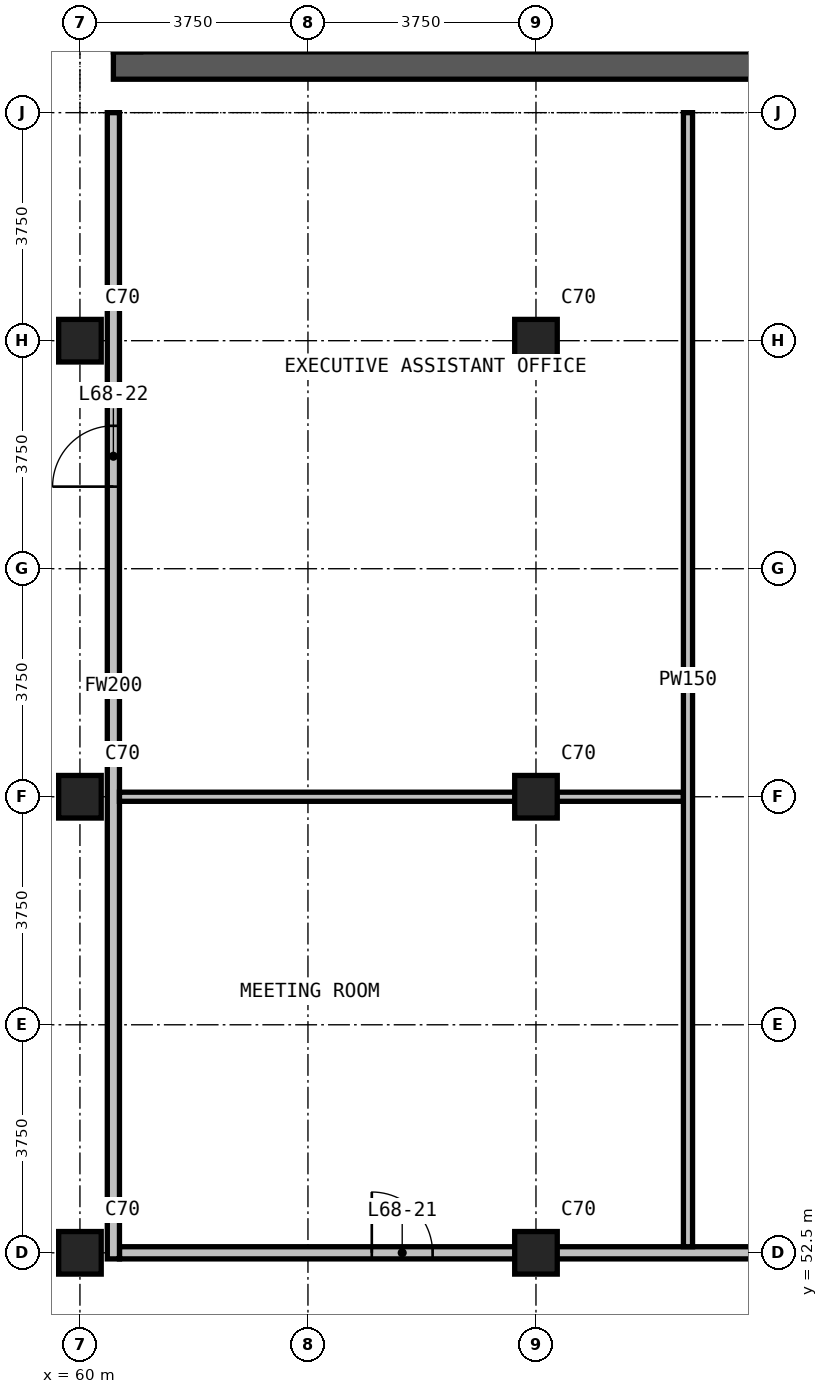
"""IFC4 building model, lengths in metres.
Left out: names, types, materials, properties, quantities, classifications, styles, units other than length and angle.
Written with IfcOpenShell. Run it as: python <this file> out.ifc"""

import sys

from ifc_helpers import new_model, si_unit, direction, frame, frame_2d, origin, origin_2d, place, context, subcontext, project, spatial, rectangle, extrude, element, fill, save


model = new_model("IFC4")
c1 = context("Model", 3, precision=1e-05, world=origin(), true_north=direction((0.0, 1.0)))
c2 = subcontext(c1, "Body", "Model", "MODEL_VIEW")
j1 = project(units=[si_unit("LENGTHUNIT", "METRE"), si_unit("PLANEANGLEUNIT", "RADIAN")], contexts=[c1])
p1 = place(None, origin())
s1 = spatial("IfcSite", under=j1, at=p1, CompositionType="ELEMENT")
p2 = place(p1, origin())
s2 = spatial("IfcBuilding", under=s1, at=p2, CompositionType="ELEMENT")
p3 = place(p2, frame((0.0, 0.0, 262.1)))
s3 = spatial("IfcBuildingStorey", under=s2, at=p3, CompositionType="ELEMENT", Elevation=262.1)
for number, where, z_axis, x_axis in (
    (1, (60.0, 52.5, 0.0), (0.0, 0.0, 1.0), (1.0, 0.0, 0.0)),
    (2, (60.0, 60.0, 0.0), (0.0, 0.0, 1.0), (1.0, 0.0, 0.0)),
    (3, (60.0, 67.5, 0.0), (0.0, 0.0, 1.0), (1.0, 0.0, 0.0)),
    (4, (67.5, 52.5, 0.0), (0.0, 0.0, 1.0), (1.0, 0.0, 0.0)),
    (5, (67.5, 60.0, 0.0), (0.0, 0.0, 1.0), (1.0, 0.0, 0.0)),
    (6, (67.5, 67.5, 0.0), (0.0, 0.0, 1.0), (1.0, 0.0, 0.0)),
):
    element("IfcColumn", number, at=place(p3, frame(where, z_axis=z_axis, x_axis=x_axis)), inside=s3, PredefinedType="COLUMN", context=c2, shape_type="SweptSolid", body=[
        extrude(rectangle(XDim=0.7, YDim=0.7, at=origin_2d()), origin(), (0.0, 0.0, 1.0), 3.6),
    ])
p4 = place(p3, frame((60.55, 72.025, 0.0), z_axis=(0.0, 0.0, 1.0), x_axis=(1.0, 0.0, 0.0)))
e7 = element("IfcWall", 7, at=p4, inside=s3, PredefinedType="SHEAR", context=c2, shape_type="SweptSolid", body=[
    extrude(rectangle(XDim=28.9, YDim=0.45, at=frame_2d((14.45, 0.0))), origin(), (0.0, 0.0, 1.0), 3.6),
])
p5 = place(p3, frame((60.65, 52.5, 0.0), z_axis=(0.0, 0.0, 1.0), x_axis=(1.0, 0.0, 0.0)))
e8 = element("IfcWall", 8, at=p5, inside=s3, PredefinedType="PARTITIONING", context=c2, shape_type="SweptSolid", body=[
    extrude(rectangle(XDim=28.7, YDim=0.2, at=frame_2d((14.35, 0.0))), origin(), (0.0, 0.0, 1.0), 3.3),
])
p6 = place(p5, frame((4.15, 0.0, 0.0)))
e9 = element("IfcOpeningElement", 9, at=p6, cuts=e8, PredefinedType="OPENING", context=c2, shape_type="SweptSolid", body=[
    extrude(rectangle(XDim=1.0, YDim=2.2, at=frame_2d((0.5, 1.1))), frame((0.0, 0.11, 0.0), z_axis=(0.0, -1.0, 0.0), x_axis=(1.0, 0.0, 0.0)), (0.0, 0.0, 1.0), 0.22),
])
p7 = place(p5, frame((13.0, 0.0, 0.0)))
e10 = element("IfcOpeningElement", 10, at=p7, cuts=e8, PredefinedType="OPENING", context=c2, shape_type="SweptSolid", body=[
    extrude(rectangle(XDim=1.0, YDim=2.2, at=frame_2d((0.5, 1.1))), frame((0.0, 0.11, 0.0), z_axis=(0.0, -1.0, 0.0), x_axis=(1.0, 0.0, 0.0)), (0.0, 0.0, 1.0), 0.22),
])
p8 = place(p5, frame((20.05, 0.0, 0.0)))
e11 = element("IfcOpeningElement", 11, at=p8, cuts=e8, PredefinedType="OPENING", context=c2, shape_type="SweptSolid", body=[
    extrude(rectangle(XDim=0.9, YDim=2.2, at=frame_2d((0.45, 1.1))), frame((0.0, 0.11, 0.0), z_axis=(0.0, -1.0, 0.0), x_axis=(1.0, 0.0, 0.0)), (0.0, 0.0, 1.0), 0.22),
])
p9 = place(p5, frame((22.272, 0.0, 0.0)))
e12 = element("IfcOpeningElement", 12, at=p9, cuts=e8, PredefinedType="OPENING", context=c2, shape_type="SweptSolid", body=[
    extrude(rectangle(XDim=0.9, YDim=2.2, at=frame_2d((0.45, 1.1))), frame((0.0, 0.11, 0.0), z_axis=(0.0, -1.0, 0.0), x_axis=(1.0, 0.0, 0.0)), (0.0, 0.0, 1.0), 0.22),
])
p10 = place(p5, frame((24.3, 0.0, 0.0)))
e13 = element("IfcOpeningElement", 13, at=p10, cuts=e8, PredefinedType="OPENING", context=c2, shape_type="SweptSolid", body=[
    extrude(rectangle(XDim=1.0, YDim=2.2, at=frame_2d((0.5, 1.1))), frame((0.0, 0.11, 0.0), z_axis=(0.0, -1.0, 0.0), x_axis=(1.0, 0.0, 0.0)), (0.0, 0.0, 1.0), 0.22),
])
p11 = place(p3, frame((60.55, 52.4, 0.0), z_axis=(0.0, 0.0, 1.0), x_axis=(0.0, 1.0, 0.0)))
e14 = element("IfcWall", 14, at=p11, inside=s3, PredefinedType="PARTITIONING", context=c2, shape_type="SweptSolid", body=[
    extrude(rectangle(XDim=18.85, YDim=0.2, at=frame_2d((9.425, 0.0))), origin(), (0.0, 0.0, 1.0), 3.3),
])
p12 = place(p11, frame((12.7, 0.0, 0.0)))
e15 = element("IfcOpeningElement", 15, at=p12, cuts=e14, PredefinedType="OPENING", context=c2, shape_type="SweptSolid", body=[
    extrude(rectangle(XDim=1.0, YDim=2.2, at=frame_2d((0.5, 1.1))), frame((0.0, 0.11, 0.0), z_axis=(0.0, -1.0, 0.0), x_axis=(1.0, 0.0, 0.0)), (0.0, 0.0, 1.0), 0.22),
])
p13 = place(p3, frame((60.65, 60.0, 0.0), z_axis=(0.0, 0.0, 1.0), x_axis=(1.0, 0.0, 0.0)))
e16 = element("IfcWall", 16, at=p13, inside=s3, PredefinedType="PARTITIONING", context=c2, shape_type="SweptSolid", body=[
    extrude(rectangle(XDim=9.275, YDim=0.15, at=frame_2d((4.638, 0.0))), origin(), (0.0, 0.0, 1.0), 3.3),
])
p14 = place(p3, frame((70.0, 52.6, 0.0), z_axis=(0.0, 0.0, 1.0), x_axis=(0.0, 1.0, 0.0)))
e17 = element("IfcWall", 17, at=p14, inside=s3, PredefinedType="PARTITIONING", context=c2, shape_type="SweptSolid", body=[
    extrude(rectangle(XDim=18.65, YDim=0.15, at=frame_2d((9.325, 0.0))), origin(), (0.0, 0.0, 1.0), 3.3),
])
p15 = place(p6, origin())
e18 = element("IfcDoor", 18, at=p15, inside=s3, OperationType="SINGLE_SWING_LEFT", PredefinedType="DOOR", context=c2, shape_type="SweptSolid", body=[
    extrude(rectangle(XDim=1.0, YDim=2.2, at=frame_2d((0.5, 1.1))), frame((0.0, 0.025, 0.0), z_axis=(0.0, -1.0, 0.0), x_axis=(1.0, 0.0, 0.0)), (0.0, 0.0, 1.0), 0.05),
])
fill(e9, e18)
p16 = place(p12, origin())
e19 = element("IfcDoor", 19, at=p16, inside=s3, OperationType="SINGLE_SWING_LEFT", PredefinedType="DOOR", context=c2, shape_type="SweptSolid", body=[
    extrude(rectangle(XDim=1.0, YDim=2.2, at=frame_2d((0.5, 1.1))), frame((0.0, 0.025, 0.0), z_axis=(0.0, -1.0, 0.0), x_axis=(1.0, 0.0, 0.0)), (0.0, 0.0, 1.0), 0.05),
])
fill(e15, e19)
save(model, sys.argv[1])
